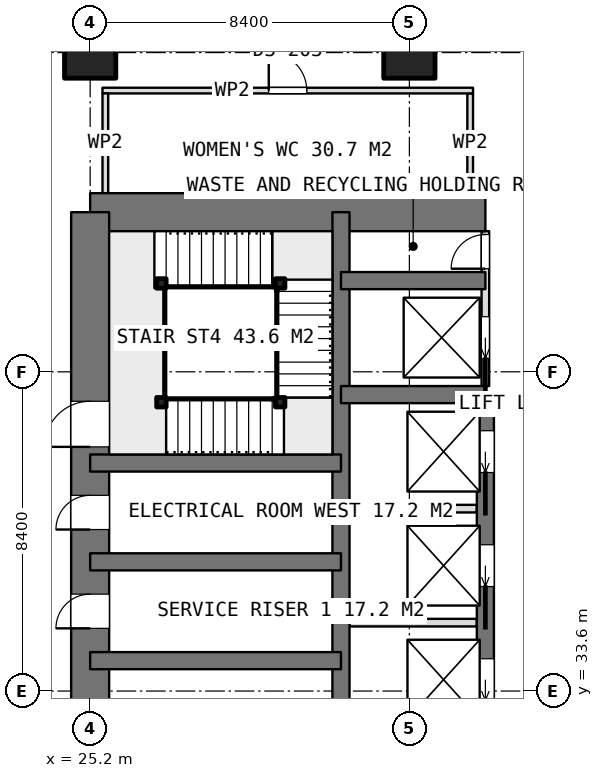
"""IFC4 building model, lengths in metres.
Left out: names, types, materials, properties, quantities, classifications, styles, units other than length and angle.
Written with IfcOpenShell. Run it as: python <this file> out.ifc"""

import sys

from ifc_helpers import new_model, si_unit, direction, frame, frame_2d, origin, origin_2d, place, context, subcontext, project, spatial, rectangle, extrude, element, fill, save


model = new_model("IFC4")
c1 = context("Model", 3, precision=1e-05, world=origin(), true_north=direction((0.0, 1.0)))
c2 = subcontext(c1, "Body", "Model", "MODEL_VIEW")
j1 = project(units=[si_unit("LENGTHUNIT", "METRE"), si_unit("PLANEANGLEUNIT", "RADIAN")], contexts=[c1])
p1 = place(None, origin())
s1 = spatial("IfcSite", under=j1, at=p1, CompositionType="ELEMENT")
p2 = place(p1, origin())
s2 = spatial("IfcBuilding", under=s1, at=p2, CompositionType="ELEMENT")
p3 = place(p2, frame((0.0, 0.0, 191.45)))
s3 = spatial("IfcBuildingStorey", under=s2, at=p3, CompositionType="ELEMENT", Elevation=191.45)
p4 = place(p3, frame((25.2, 46.2, 0.0), z_axis=(0.0, 0.0, 1.0), x_axis=(1.0, 0.0, 0.0)))
e1 = element("IfcWall", 1, at=p4, inside=s3, PredefinedType="SHEAR", context=c2, shape_type="SweptSolid", body=[
    extrude(rectangle(XDim=10.4, YDim=1.0, at=frame_2d((5.2, 0.0))), origin(), (0.0, 0.0, 1.0), 3.75),
])
p5 = place(p3, frame((25.2, 21.0, 0.0), z_axis=(0.0, 0.0, 1.0), x_axis=(0.0, 1.0, 0.0)))
e2 = element("IfcWall", 2, at=p5, inside=s3, PredefinedType="SHEAR", context=c2, shape_type="SweptSolid", body=[
    extrude(rectangle(XDim=25.2, YDim=1.0, at=frame_2d((12.6, 0.0))), origin(), (0.0, 0.0, 1.0), 3.75),
])
p6 = place(p5, frame((7.8, 0.0, 0.0)))
e3 = element("IfcOpeningElement", 3, at=p6, cuts=e2, PredefinedType="OPENING", context=c2, shape_type="SweptSolid", body=[
    extrude(rectangle(XDim=1.2, YDim=2.1, at=frame_2d((0.6, 1.05))), frame((0.0, 0.51, 0.0), z_axis=(0.0, -1.0, 0.0), x_axis=(1.0, 0.0, 0.0)), (0.0, 0.0, 1.0), 1.02),
])
p7 = place(p5, frame((14.25, 0.0, 0.0)))
e4 = element("IfcOpeningElement", 4, at=p7, cuts=e2, PredefinedType="OPENING", context=c2, shape_type="SweptSolid", body=[
    extrude(rectangle(XDim=0.9, YDim=2.1, at=frame_2d((0.45, 1.05))), frame((0.0, 0.51, 0.0), z_axis=(0.0, -1.0, 0.0), x_axis=(1.0, 0.0, 0.0)), (0.0, 0.0, 1.0), 1.02),
])
p8 = place(p5, frame((16.85, 0.0, 0.0)))
e5 = element("IfcOpeningElement", 5, at=p8, cuts=e2, PredefinedType="OPENING", context=c2, shape_type="SweptSolid", body=[
    extrude(rectangle(XDim=0.9, YDim=2.1, at=frame_2d((0.45, 1.05))), frame((0.0, 0.51, 0.0), z_axis=(0.0, -1.0, 0.0), x_axis=(1.0, 0.0, 0.0)), (0.0, 0.0, 1.0), 1.02),
])
p9 = place(p5, frame((19.025, 0.0, 0.0)))
e6 = element("IfcOpeningElement", 6, at=p9, cuts=e2, PredefinedType="OPENING", context=c2, shape_type="SweptSolid", body=[
    extrude(rectangle(XDim=1.2, YDim=2.1, at=frame_2d((0.6, 1.05))), frame((0.0, 0.51, 0.0), z_axis=(0.0, -1.0, 0.0), x_axis=(1.0, 0.0, 0.0)), (0.0, 0.0, 1.0), 1.02),
])
p10 = place(p3, frame((31.8, 21.0, 0.0), z_axis=(0.0, 0.0, 1.0), x_axis=(0.0, 1.0, 0.0)))
e7 = element("IfcWall", 7, at=p10, inside=s3, PredefinedType="SHEAR", context=c2, shape_type="SweptSolid", body=[
    extrude(rectangle(XDim=25.2, YDim=0.45, at=frame_2d((12.6, 0.0))), origin(), (0.0, 0.0, 1.0), 3.75),
])
p11 = place(p3, frame((35.6, 23.4, 0.0), z_axis=(0.0, 0.0, 1.0), x_axis=(0.0, 1.0, 0.0)))
e8 = element("IfcWall", 8, at=p11, inside=s3, PredefinedType="SHEAR", context=c2, shape_type="SweptSolid", body=[
    extrude(rectangle(XDim=18.0, YDim=0.45, at=frame_2d((9.0, 0.0))), origin(), (0.0, 0.0, 1.0), 3.75),
])
p12 = place(p11, frame((0.95, 0.0, 0.0)))
e9 = element("IfcOpeningElement", 9, at=p12, cuts=e8, PredefinedType="OPENING", context=c2, shape_type="SweptSolid", body=[
    extrude(rectangle(XDim=1.1, YDim=2.1, at=frame_2d((0.55, 1.05))), frame((0.0, 0.235, 0.0), z_axis=(0.0, -1.0, 0.0), x_axis=(1.0, 0.0, 0.0)), (0.0, 0.0, 1.0), 0.47),
])
p13 = place(p11, frame((3.95, 0.0, 0.0)))
e10 = element("IfcOpeningElement", 10, at=p13, cuts=e8, PredefinedType="OPENING", context=c2, shape_type="SweptSolid", body=[
    extrude(rectangle(XDim=1.1, YDim=2.1, at=frame_2d((0.55, 1.05))), frame((0.0, 0.235, 0.0), z_axis=(0.0, -1.0, 0.0), x_axis=(1.0, 0.0, 0.0)), (0.0, 0.0, 1.0), 0.47),
])
p14 = place(p11, frame((6.95, 0.0, 0.0)))
e11 = element("IfcOpeningElement", 11, at=p14, cuts=e8, PredefinedType="OPENING", context=c2, shape_type="SweptSolid", body=[
    extrude(rectangle(XDim=1.1, YDim=2.1, at=frame_2d((0.55, 1.05))), frame((0.0, 0.235, 0.0), z_axis=(0.0, -1.0, 0.0), x_axis=(1.0, 0.0, 0.0)), (0.0, 0.0, 1.0), 0.47),
])
p15 = place(p11, frame((9.95, 0.0, 0.0)))
e12 = element("IfcOpeningElement", 12, at=p15, cuts=e8, PredefinedType="OPENING", context=c2, shape_type="SweptSolid", body=[
    extrude(rectangle(XDim=1.1, YDim=2.1, at=frame_2d((0.55, 1.05))), frame((0.0, 0.235, 0.0), z_axis=(0.0, -1.0, 0.0), x_axis=(1.0, 0.0, 0.0)), (0.0, 0.0, 1.0), 0.47),
])
p16 = place(p11, frame((12.95, 0.0, 0.0)))
e13 = element("IfcOpeningElement", 13, at=p16, cuts=e8, PredefinedType="OPENING", context=c2, shape_type="SweptSolid", body=[
    extrude(rectangle(XDim=1.1, YDim=2.1, at=frame_2d((0.55, 1.05))), frame((0.0, 0.235, 0.0), z_axis=(0.0, -1.0, 0.0), x_axis=(1.0, 0.0, 0.0)), (0.0, 0.0, 1.0), 0.47),
])
p17 = place(p11, frame((15.95, 0.0, 0.0)))
e14 = element("IfcOpeningElement", 14, at=p17, cuts=e8, PredefinedType="OPENING", context=c2, shape_type="SweptSolid", body=[
    extrude(rectangle(XDim=1.1, YDim=2.1, at=frame_2d((0.55, 1.05))), frame((0.0, 0.235, 0.0), z_axis=(0.0, -1.0, 0.0), x_axis=(1.0, 0.0, 0.0)), (0.0, 0.0, 1.0), 0.47),
])
for number, where, z_axis, x_axis in (
    (15, (31.8, 41.4, 0.0), (0.0, 0.0, 1.0), (1.0, 0.0, 0.0)),
    (16, (31.8, 44.4, 0.0), (0.0, 0.0, 1.0), (1.0, 0.0, 0.0)),
):
    element("IfcWall", number, at=place(p3, frame(where, z_axis=z_axis, x_axis=x_axis)), inside=s3, PredefinedType="SHEAR", context=c2, shape_type="SweptSolid", body=[
        extrude(rectangle(XDim=3.8, YDim=0.45, at=frame_2d((1.9, 0.0))), origin(), (0.0, 0.0, 1.0), 3.75),
    ])
for number, where, z_axis, x_axis in (
    (17, (25.2, 34.4, 0.0), (0.0, 0.0, 1.0), (1.0, 0.0, 0.0)),
    (18, (25.2, 37.0, 0.0), (0.0, 0.0, 1.0), (1.0, 0.0, 0.0)),
    (19, (25.2, 39.6, 0.0), (0.0, 0.0, 1.0), (1.0, 0.0, 0.0)),
):
    element("IfcWall", number, at=place(p3, frame(where, z_axis=z_axis, x_axis=x_axis)), inside=s3, PredefinedType="SHEAR", context=c2, shape_type="SweptSolid", body=[
        extrude(rectangle(XDim=6.6, YDim=0.45, at=frame_2d((3.3, 0.0))), origin(), (0.0, 0.0, 1.0), 3.75),
    ])
for number, where, z_axis, x_axis in (
    (20, (25.2, 50.4, 0.0), (0.0, 0.0, 1.0), (1.0, 0.0, 0.0)),
    (21, (33.6, 50.4, 0.0), (0.0, 0.0, 1.0), (1.0, 0.0, 0.0)),
):
    element("IfcColumn", number, at=place(p3, frame(where, z_axis=z_axis, x_axis=x_axis)), inside=s3, PredefinedType="COLUMN", context=c2, shape_type="SweptSolid", body=[
        extrude(rectangle(XDim=1.35, YDim=1.35, at=origin_2d()), origin(), (0.0, 0.0, 1.0), 3.75),
    ])
for number, where, z_axis, x_axis in (
    (22, (32.025, 35.4, 0.0), (0.0, 0.0, 1.0), (1.0, 0.0, 0.0)),
    (23, (32.025, 38.4, 0.0), (0.0, 0.0, 1.0), (1.0, 0.0, 0.0)),
):
    element("IfcWall", number, at=place(p3, frame(where, z_axis=z_axis, x_axis=x_axis)), inside=s3, PredefinedType="PARTITIONING", context=c2, shape_type="SweptSolid", body=[
        extrude(rectangle(XDim=3.35, YDim=0.2, at=frame_2d((1.675, 0.0))), origin(), (0.0, 0.0, 1.0), 3.5),
    ])
p18 = place(p3, frame((35.6, 41.625, 0.0), z_axis=(0.0, 0.0, 1.0), x_axis=(0.0, 1.0, 0.0)))
e24 = element("IfcWall", 24, at=p18, inside=s3, PredefinedType="PARTITIONING", context=c2, shape_type="SweptSolid", body=[
    extrude(rectangle(XDim=4.075, YDim=0.2, at=frame_2d((2.038, 0.0))), origin(), (0.0, 0.0, 1.0), 3.5),
])
p19 = place(p18, frame((3.088, 0.0, 0.0)))
e25 = element("IfcOpeningElement", 25, at=p19, cuts=e24, PredefinedType="OPENING", context=c2, shape_type="SweptSolid", body=[
    extrude(rectangle(XDim=0.9, YDim=2.1, at=frame_2d((0.45, 1.05))), frame((0.0, 0.11, 0.0), z_axis=(0.0, -1.0, 0.0), x_axis=(1.0, 0.0, 0.0)), (0.0, 0.0, 1.0), 0.22),
])
p20 = place(p18, frame((0.725, 0.0, 0.0)))
e26 = element("IfcOpeningElement", 26, at=p20, cuts=e24, PredefinedType="OPENING", context=c2, shape_type="SweptSolid", body=[
    extrude(rectangle(XDim=1.1, YDim=2.1, at=frame_2d((0.55, 1.05))), frame((0.0, 0.11, 0.0), z_axis=(0.0, -1.0, 0.0), x_axis=(1.0, 0.0, 0.0)), (0.0, 0.0, 1.0), 0.22),
])
p21 = place(p3, frame((25.525, 49.4, 0.0), z_axis=(0.0, 0.0, 1.0), x_axis=(1.0, 0.0, 0.0)))
e27 = element("IfcWall", 27, at=p21, inside=s3, PredefinedType="PARTITIONING", context=c2, shape_type="SweptSolid", body=[
    extrude(rectangle(XDim=9.75, YDim=0.15, at=frame_2d((4.875, 0.0))), origin(), (0.0, 0.0, 1.0), 3.5),
])
p22 = place(p21, frame((4.375, 0.0, 0.0)))
e28 = element("IfcOpeningElement", 28, at=p22, cuts=e27, PredefinedType="OPENING", context=c2, shape_type="SweptSolid", body=[
    extrude(rectangle(XDim=1.0, YDim=2.1, at=frame_2d((0.5, 1.05))), frame((0.0, 0.085, 0.0), z_axis=(0.0, -1.0, 0.0), x_axis=(1.0, 0.0, 0.0)), (0.0, 0.0, 1.0), 0.17),
])
for number, where, z_axis, x_axis in (
    (29, (25.6, 46.7, 0.0), (0.0, 0.0, 1.0), (0.0, 1.0, 0.0)),
    (30, (35.2, 46.7, 0.0), (0.0, 0.0, 1.0), (0.0, 1.0, 0.0)),
):
    element("IfcWall", number, at=place(p3, frame(where, z_axis=z_axis, x_axis=x_axis)), inside=s3, PredefinedType="PARTITIONING", context=c2, shape_type="SweptSolid", body=[
        extrude(rectangle(XDim=2.625, YDim=0.15, at=frame_2d((1.312, 0.0))), origin(), (0.0, 0.0, 1.0), 3.5),
    ])
for number, where, z_axis, x_axis in (
    (31, (27.075, 41.2, 0.0), (0.0, 0.0, 1.0), (1.0, 0.0, 0.0)),
    (32, (30.2, 41.2, 0.0), (0.0, 0.0, 1.0), (1.0, 0.0, 0.0)),
    (33, (30.2, 44.325, 0.0), (0.0, 0.0, 1.0), (1.0, 0.0, 0.0)),
    (34, (27.075, 44.325, 0.0), (0.0, 0.0, 1.0), (1.0, 0.0, 0.0)),
):
    element("IfcColumn", number, at=place(p3, frame(where, z_axis=z_axis, x_axis=x_axis)), inside=s3, PredefinedType="COLUMN", context=c2, shape_type="SweptSolid", body=[
        extrude(rectangle(XDim=0.25, YDim=0.25, at=origin_2d()), origin(), (0.0, 0.0, 1.0), 3.75),
    ])
p23 = place(p7, origin())
e35 = element("IfcDoor", 35, at=p23, inside=s3, OperationType="SINGLE_SWING_LEFT", PredefinedType="DOOR", context=c2, shape_type="SweptSolid", body=[
    extrude(rectangle(XDim=0.9, YDim=2.1, at=frame_2d((0.45, 1.05))), frame((0.0, 0.025, 0.0), z_axis=(0.0, -1.0, 0.0), x_axis=(1.0, 0.0, 0.0)), (0.0, 0.0, 1.0), 0.05),
])
fill(e4, e35)
p24 = place(p8, origin())
e36 = element("IfcDoor", 36, at=p24, inside=s3, OperationType="SINGLE_SWING_LEFT", PredefinedType="DOOR", context=c2, shape_type="SweptSolid", body=[
    extrude(rectangle(XDim=0.9, YDim=2.1, at=frame_2d((0.45, 1.05))), frame((0.0, 0.025, 0.0), z_axis=(0.0, -1.0, 0.0), x_axis=(1.0, 0.0, 0.0)), (0.0, 0.0, 1.0), 0.05),
])
fill(e5, e36)
p25 = place(p19, origin())
e37 = element("IfcDoor", 37, at=p25, inside=s3, OperationType="SINGLE_SWING_LEFT", PredefinedType="DOOR", context=c2, shape_type="SweptSolid", body=[
    extrude(rectangle(XDim=0.9, YDim=2.1, at=frame_2d((0.45, 1.05))), frame((0.0, 0.025, 0.0), z_axis=(0.0, -1.0, 0.0), x_axis=(1.0, 0.0, 0.0)), (0.0, 0.0, 1.0), 0.05),
])
fill(e25, e37)
p26 = place(p15, origin())
e38 = element("IfcDoor", 38, at=p26, inside=s3, OperationType="SLIDING_TO_LEFT", PredefinedType="USERDEFINED", context=c2, shape_type="SweptSolid", body=[
    extrude(rectangle(XDim=1.1, YDim=2.1, at=frame_2d((0.55, 1.05))), frame((0.0, 0.025, 0.0), z_axis=(0.0, -1.0, 0.0), x_axis=(1.0, 0.0, 0.0)), (0.0, 0.0, 1.0), 0.05),
])
fill(e12, e38)
p27 = place(p16, origin())
e39 = element("IfcDoor", 39, at=p27, inside=s3, OperationType="SLIDING_TO_LEFT", PredefinedType="USERDEFINED", context=c2, shape_type="SweptSolid", body=[
    extrude(rectangle(XDim=1.1, YDim=2.1, at=frame_2d((0.55, 1.05))), frame((0.0, 0.025, 0.0), z_axis=(0.0, -1.0, 0.0), x_axis=(1.0, 0.0, 0.0)), (0.0, 0.0, 1.0), 0.05),
])
fill(e13, e39)
p28 = place(p17, origin())
e40 = element("IfcDoor", 40, at=p28, inside=s3, OperationType="SLIDING_TO_LEFT", PredefinedType="USERDEFINED", context=c2, shape_type="SweptSolid", body=[
    extrude(rectangle(XDim=1.1, YDim=2.1, at=frame_2d((0.55, 1.05))), frame((0.0, 0.025, 0.0), z_axis=(0.0, -1.0, 0.0), x_axis=(1.0, 0.0, 0.0)), (0.0, 0.0, 1.0), 0.05),
])
fill(e14, e40)
p29 = place(p20, origin())
e41 = element("IfcDoor", 41, at=p29, inside=s3, OperationType="SLIDING_TO_LEFT", PredefinedType="USERDEFINED", context=c2, shape_type="SweptSolid", body=[
    extrude(rectangle(XDim=1.1, YDim=2.1, at=frame_2d((0.55, 1.05))), frame((0.0, 0.025, 0.0), z_axis=(0.0, -1.0, 0.0), x_axis=(1.0, 0.0, 0.0)), (0.0, 0.0, 1.0), 0.05),
])
fill(e26, e41)
p30 = place(p22, origin())
e42 = element("IfcDoor", 42, at=p30, inside=s3, OperationType="SINGLE_SWING_LEFT", PredefinedType="DOOR", context=c2, shape_type="SweptSolid", body=[
    extrude(rectangle(XDim=1.0, YDim=2.1, at=frame_2d((0.5, 1.05))), frame((0.0, 0.025, 0.0), z_axis=(0.0, -1.0, 0.0), x_axis=(1.0, 0.0, 0.0)), (0.0, 0.0, 1.0), 0.05),
])
fill(e28, e42)
p31 = place(p9, origin())
e43 = element("IfcDoor", 43, at=p31, inside=s3, OperationType="SINGLE_SWING_RIGHT", PredefinedType="DOOR", context=c2, shape_type="SweptSolid", body=[
    extrude(rectangle(XDim=1.2, YDim=2.1, at=frame_2d((0.6, 1.05))), frame((0.0, 0.025, 0.0), z_axis=(0.0, -1.0, 0.0), x_axis=(1.0, 0.0, 0.0)), (0.0, 0.0, 1.0), 0.05),
])
fill(e6, e43)
save(model, sys.argv[1])
